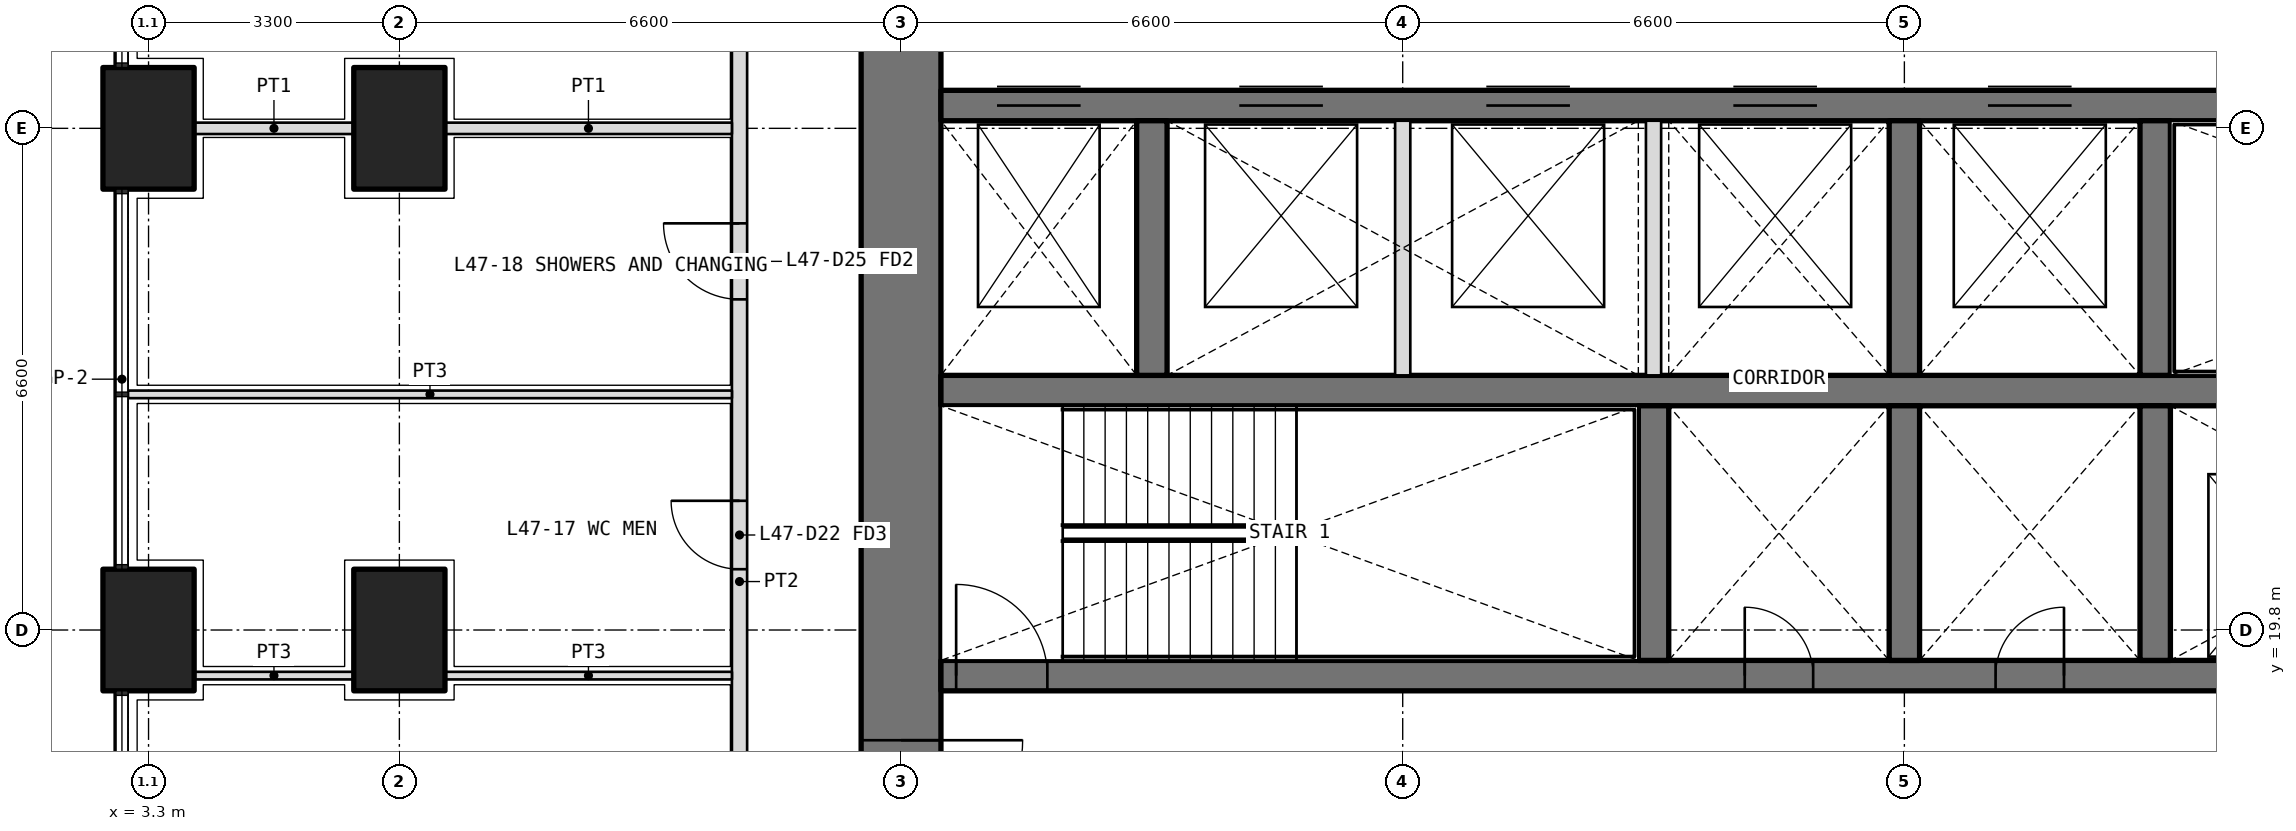
"""IFC4 building model, lengths in metres.
Left out: names, types, materials, properties, quantities, classifications, styles, units other than length and angle.
Written with IfcOpenShell. Run it as: python <this file> out.ifc"""

import sys

from ifc_helpers import new_model, si_unit, direction, frame, frame_2d, origin, origin_2d, place, context, subcontext, project, spatial, rectangle, extrude, element, fill, save


model = new_model("IFC4")
c1 = context("Model", 3, precision=1e-05, world=origin(), true_north=direction((0.0, 1.0)))
c2 = subcontext(c1, "Body", "Model", "MODEL_VIEW")
j1 = project(units=[si_unit("LENGTHUNIT", "METRE"), si_unit("PLANEANGLEUNIT", "RADIAN")], contexts=[c1])
p1 = place(None, origin())
s1 = spatial("IfcSite", under=j1, at=p1, CompositionType="ELEMENT")
p2 = place(p1, origin())
s2 = spatial("IfcBuilding", under=s1, at=p2, CompositionType="ELEMENT")
p3 = place(p2, frame((0.0, 0.0, 206.1)))
s3 = spatial("IfcBuildingStorey", under=s2, at=p3, CompositionType="ELEMENT", Elevation=206.1)
for number, where, z_axis, x_axis in (
    (1, (3.3, 19.8, 0.0), (0.0, 0.0, 1.0), (0.0, 1.0, 0.0)),
    (2, (3.3, 26.4, 0.0), (0.0, 0.0, 1.0), (0.0, 1.0, 0.0)),
    (3, (6.6, 19.8, 0.0), (0.0, 0.0, 1.0), (0.0, 1.0, 0.0)),
    (4, (6.6, 26.4, 0.0), (0.0, 0.0, 1.0), (0.0, 1.0, 0.0)),
):
    element("IfcColumn", number, at=place(p3, frame(where, z_axis=z_axis, x_axis=x_axis)), inside=s3, PredefinedType="COLUMN", context=c2, shape_type="SweptSolid", body=[
        extrude(rectangle(XDim=1.6, YDim=1.2, at=origin_2d()), origin(), (0.0, 0.0, 1.0), 4.2),
    ])
p4 = place(p3, frame((13.2, 32.475, 0.0), z_axis=(0.0, 0.0, 1.0), x_axis=(0.0, -1.0, 0.0)))
e5 = element("IfcWall", 5, at=p4, inside=s3, PredefinedType="SHEAR", context=c2, shape_type="SweptSolid", body=[
    extrude(rectangle(XDim=18.75, YDim=1.05, at=frame_2d((9.375, 0.0))), origin(), (0.0, 0.0, 1.0), 4.2),
])
p5 = place(p4, frame((14.125, 0.0, 0.0)))
e6 = element("IfcOpeningElement", 6, at=p5, cuts=e5, PredefinedType="OPENING", context=c2, shape_type="SweptSolid", body=[
    extrude(rectangle(XDim=1.6, YDim=2.1, at=frame_2d((0.8, 1.05))), frame((0.0, 0.535, 0.0), z_axis=(0.0, -1.0, 0.0), x_axis=(1.0, 0.0, 0.0)), (0.0, 0.0, 1.0), 1.07),
])
p6 = place(p4, frame((3.325, 0.0, 0.0)))
e7 = element("IfcOpeningElement", 7, at=p6, cuts=e5, PredefinedType="OPENING", context=c2, shape_type="SweptSolid", body=[
    extrude(rectangle(XDim=1.6, YDim=2.1, at=frame_2d((0.8, 1.05))), frame((0.0, 0.535, 0.0), z_axis=(0.0, -1.0, 0.0), x_axis=(1.0, 0.0, 0.0)), (0.0, 0.0, 1.0), 1.07),
])
p7 = place(p3, frame((13.725, 19.2, 0.0), z_axis=(0.0, 0.0, 1.0), x_axis=(1.0, 0.0, 0.0)))
e8 = element("IfcWall", 8, at=p7, inside=s3, PredefinedType="SHEAR", context=c2, shape_type="SweptSolid", body=[
    extrude(rectangle(XDim=25.35, YDim=0.4, at=frame_2d((12.675, 0.0))), origin(), (0.0, 0.0, 1.0), 4.2),
])
p8 = place(p7, frame((10.575, 0.0, 0.0)))
e9 = element("IfcOpeningElement", 9, at=p8, cuts=e8, PredefinedType="OPENING", context=c2, shape_type="SweptSolid", body=[
    extrude(rectangle(XDim=0.9, YDim=2.1, at=frame_2d((0.45, 1.05))), frame((0.0, 0.21, 0.0), z_axis=(0.0, -1.0, 0.0), x_axis=(1.0, 0.0, 0.0)), (0.0, 0.0, 1.0), 0.42),
])
p9 = place(p7, frame((13.875, 0.0, 0.0)))
e10 = element("IfcOpeningElement", 10, at=p9, cuts=e8, PredefinedType="OPENING", context=c2, shape_type="SweptSolid", body=[
    extrude(rectangle(XDim=0.9, YDim=2.1, at=frame_2d((0.45, 1.05))), frame((0.0, 0.21, 0.0), z_axis=(0.0, -1.0, 0.0), x_axis=(1.0, 0.0, 0.0)), (0.0, 0.0, 1.0), 0.42),
])
p10 = place(p7, frame((0.2, 0.0, 0.0)))
e11 = element("IfcOpeningElement", 11, at=p10, cuts=e8, PredefinedType="OPENING", context=c2, shape_type="SweptSolid", body=[
    extrude(rectangle(XDim=1.2, YDim=2.1, at=frame_2d((0.6, 1.05))), frame((0.0, 0.21, 0.0), z_axis=(0.0, -1.0, 0.0), x_axis=(1.0, 0.0, 0.0)), (0.0, 0.0, 1.0), 0.42),
])
p11 = place(p7, frame((23.512, 0.0, 0.0)))
e12 = element("IfcOpeningElement", 12, at=p11, cuts=e8, PredefinedType="OPENING", context=c2, shape_type="SweptSolid", body=[
    extrude(rectangle(XDim=1.1, YDim=2.1, at=frame_2d((0.55, 1.05))), frame((0.0, 0.21, 0.0), z_axis=(0.0, -1.0, 0.0), x_axis=(1.0, 0.0, 0.0)), (0.0, 0.0, 1.0), 0.42),
])
p12 = place(p7, frame((17.125, 0.0, 0.0)))
e13 = element("IfcOpeningElement", 13, at=p12, cuts=e8, PredefinedType="OPENING", context=c2, shape_type="SweptSolid", body=[
    extrude(rectangle(XDim=1.1, YDim=2.1, at=frame_2d((0.55, 1.05))), frame((0.0, 0.21, 0.0), z_axis=(0.0, -1.0, 0.0), x_axis=(1.0, 0.0, 0.0)), (0.0, 0.0, 1.0), 0.42),
])
p13 = place(p7, frame((20.325, 0.0, 0.0)))
e14 = element("IfcOpeningElement", 14, at=p13, cuts=e8, PredefinedType="OPENING", context=c2, shape_type="SweptSolid", body=[
    extrude(rectangle(XDim=1.1, YDim=2.1, at=frame_2d((0.55, 1.05))), frame((0.0, 0.21, 0.0), z_axis=(0.0, -1.0, 0.0), x_axis=(1.0, 0.0, 0.0)), (0.0, 0.0, 1.0), 0.42),
])
p14 = place(p3, frame((13.725, 22.95, 0.0), z_axis=(0.0, 0.0, 1.0), x_axis=(1.0, 0.0, 0.0)))
e15 = element("IfcWall", 15, at=p14, inside=s3, PredefinedType="SHEAR", context=c2, shape_type="SweptSolid", body=[
    extrude(rectangle(XDim=25.35, YDim=0.4, at=frame_2d((12.675, 0.0))), origin(), (0.0, 0.0, 1.0), 4.2),
])
p15 = place(p3, frame((13.725, 26.7, 0.0), z_axis=(0.0, 0.0, 1.0), x_axis=(1.0, 0.0, 0.0)))
e16 = element("IfcWall", 16, at=p15, inside=s3, PredefinedType="SHEAR", context=c2, shape_type="SweptSolid", body=[
    extrude(rectangle(XDim=25.35, YDim=0.4, at=frame_2d((12.675, 0.0))), origin(), (0.0, 0.0, 1.0), 4.2),
])
p16 = place(p15, frame((23.95, 0.0, 0.0)))
e17 = element("IfcOpeningElement", 17, at=p16, cuts=e16, PredefinedType="OPENING", context=c2, shape_type="SweptSolid", body=[
    extrude(rectangle(XDim=1.2, YDim=2.1, at=frame_2d((0.6, 1.05))), frame((0.0, 0.21, 0.0), z_axis=(0.0, -1.0, 0.0), x_axis=(1.0, 0.0, 0.0)), (0.0, 0.0, 1.0), 0.42),
])
p17 = place(p15, frame((0.738, 0.0, 0.0)))
e18 = element("IfcOpeningElement", 18, at=p17, cuts=e16, PredefinedType="OPENING", context=c2, shape_type="SweptSolid", body=[
    extrude(rectangle(XDim=1.1, YDim=2.1, at=frame_2d((0.55, 1.05))), frame((0.0, 0.21, 0.0), z_axis=(0.0, -1.0, 0.0), x_axis=(1.0, 0.0, 0.0)), (0.0, 0.0, 1.0), 0.42),
])
p18 = place(p15, frame((3.925, 0.0, 0.0)))
e19 = element("IfcOpeningElement", 19, at=p18, cuts=e16, PredefinedType="OPENING", context=c2, shape_type="SweptSolid", body=[
    extrude(rectangle(XDim=1.1, YDim=2.1, at=frame_2d((0.55, 1.05))), frame((0.0, 0.21, 0.0), z_axis=(0.0, -1.0, 0.0), x_axis=(1.0, 0.0, 0.0)), (0.0, 0.0, 1.0), 0.42),
])
p19 = place(p15, frame((7.175, 0.0, 0.0)))
e20 = element("IfcOpeningElement", 20, at=p19, cuts=e16, PredefinedType="OPENING", context=c2, shape_type="SweptSolid", body=[
    extrude(rectangle(XDim=1.1, YDim=2.1, at=frame_2d((0.55, 1.05))), frame((0.0, 0.21, 0.0), z_axis=(0.0, -1.0, 0.0), x_axis=(1.0, 0.0, 0.0)), (0.0, 0.0, 1.0), 0.42),
])
p20 = place(p15, frame((10.425, 0.0, 0.0)))
e21 = element("IfcOpeningElement", 21, at=p20, cuts=e16, PredefinedType="OPENING", context=c2, shape_type="SweptSolid", body=[
    extrude(rectangle(XDim=1.1, YDim=2.1, at=frame_2d((0.55, 1.05))), frame((0.0, 0.21, 0.0), z_axis=(0.0, -1.0, 0.0), x_axis=(1.0, 0.0, 0.0)), (0.0, 0.0, 1.0), 0.42),
])
p21 = place(p15, frame((13.775, 0.0, 0.0)))
e22 = element("IfcOpeningElement", 22, at=p21, cuts=e16, PredefinedType="OPENING", context=c2, shape_type="SweptSolid", body=[
    extrude(rectangle(XDim=1.1, YDim=2.1, at=frame_2d((0.55, 1.05))), frame((0.0, 0.21, 0.0), z_axis=(0.0, -1.0, 0.0), x_axis=(1.0, 0.0, 0.0)), (0.0, 0.0, 1.0), 0.42),
])
for number, where, z_axis, x_axis in (
    (23, (23.1, 19.4, 0.0), (0.0, 0.0, 1.0), (0.0, 1.0, 0.0)),
    (24, (26.4, 19.4, 0.0), (0.0, 0.0, 1.0), (0.0, 1.0, 0.0)),
    (25, (29.7, 19.4, 0.0), (0.0, 0.0, 1.0), (0.0, 1.0, 0.0)),
    (26, (16.5, 23.15, 0.0), (0.0, 0.0, 1.0), (0.0, 1.0, 0.0)),
    (27, (26.4, 23.15, 0.0), (0.0, 0.0, 1.0), (0.0, 1.0, 0.0)),
    (28, (29.7, 23.15, 0.0), (0.0, 0.0, 1.0), (0.0, 1.0, 0.0)),
):
    element("IfcWall", number, at=place(p3, frame(where, z_axis=z_axis, x_axis=x_axis)), inside=s3, PredefinedType="SHEAR", context=c2, shape_type="SweptSolid", body=[
        extrude(rectangle(XDim=3.35, YDim=0.4, at=frame_2d((1.675, 0.0))), origin(), (0.0, 0.0, 1.0), 4.2),
    ])
for number, where, z_axis, x_axis in (
    (29, (19.8, 23.15, 0.0), (0.0, 0.0, 1.0), (0.0, 1.0, 0.0)),
    (30, (23.1, 23.15, 0.0), (0.0, 0.0, 1.0), (0.0, 1.0, 0.0)),
):
    element("IfcWall", number, at=place(p3, frame(where, z_axis=z_axis, x_axis=x_axis)), inside=s3, PredefinedType="PARTITIONING", context=c2, shape_type="SweptSolid", body=[
        extrude(rectangle(XDim=3.35, YDim=0.2, at=frame_2d((1.675, 0.0))), origin(), (0.0, 0.0, 1.0), 4.2),
    ])
p22 = place(p3, frame((11.075, 11.175, 0.0), z_axis=(0.0, 0.0, 1.0), x_axis=(0.0, 1.0, 0.0)))
e31 = element("IfcWall", 31, at=p22, inside=s3, PredefinedType="PARTITIONING", context=c2, shape_type="SweptSolid", body=[
    extrude(rectangle(XDim=18.525, YDim=0.2, at=frame_2d((9.262, 0.0))), origin(), (0.0, 0.0, 1.0), 2.85),
])
p23 = place(p22, frame((0.363, 0.0, 0.0)))
e32 = element("IfcOpeningElement", 32, at=p23, cuts=e31, PredefinedType="OPENING", context=c2, shape_type="SweptSolid", body=[
    extrude(rectangle(XDim=1.2, YDim=2.1, at=frame_2d((0.6, 1.05))), frame((0.0, 0.11, 0.0), z_axis=(0.0, -1.0, 0.0), x_axis=(1.0, 0.0, 0.0)), (0.0, 0.0, 1.0), 0.22),
])
p24 = place(p22, frame((2.575, 0.0, 0.0)))
e33 = element("IfcOpeningElement", 33, at=p24, cuts=e31, PredefinedType="OPENING", context=c2, shape_type="SweptSolid", body=[
    extrude(rectangle(XDim=1.0, YDim=2.1, at=frame_2d((0.5, 1.05))), frame((0.0, 0.11, 0.0), z_axis=(0.0, -1.0, 0.0), x_axis=(1.0, 0.0, 0.0)), (0.0, 0.0, 1.0), 0.22),
])
p25 = place(p22, frame((5.625, 0.0, 0.0)))
e34 = element("IfcOpeningElement", 34, at=p25, cuts=e31, PredefinedType="OPENING", context=c2, shape_type="SweptSolid", body=[
    extrude(rectangle(XDim=0.9, YDim=2.1, at=frame_2d((0.45, 1.05))), frame((0.0, 0.11, 0.0), z_axis=(0.0, -1.0, 0.0), x_axis=(1.0, 0.0, 0.0)), (0.0, 0.0, 1.0), 0.22),
])
p26 = place(p22, frame((9.425, 0.0, 0.0)))
e35 = element("IfcOpeningElement", 35, at=p26, cuts=e31, PredefinedType="OPENING", context=c2, shape_type="SweptSolid", body=[
    extrude(rectangle(XDim=0.9, YDim=2.1, at=frame_2d((0.45, 1.05))), frame((0.0, 0.11, 0.0), z_axis=(0.0, -1.0, 0.0), x_axis=(1.0, 0.0, 0.0)), (0.0, 0.0, 1.0), 0.22),
])
p27 = place(p22, frame((12.975, 0.0, 0.0)))
e36 = element("IfcOpeningElement", 36, at=p27, cuts=e31, PredefinedType="OPENING", context=c2, shape_type="SweptSolid", body=[
    extrude(rectangle(XDim=1.0, YDim=2.1, at=frame_2d((0.5, 1.05))), frame((0.0, 0.11, 0.0), z_axis=(0.0, -1.0, 0.0), x_axis=(1.0, 0.0, 0.0)), (0.0, 0.0, 1.0), 0.22),
])
p28 = place(p22, frame((16.275, 0.0, 0.0)))
e37 = element("IfcOpeningElement", 37, at=p28, cuts=e31, PredefinedType="OPENING", context=c2, shape_type="SweptSolid", body=[
    extrude(rectangle(XDim=1.2, YDim=2.1, at=frame_2d((0.6, 1.05))), frame((0.0, 0.11, 0.0), z_axis=(0.0, -1.0, 0.0), x_axis=(1.0, 0.0, 0.0)), (0.0, 0.0, 1.0), 0.22),
])
p29 = place(p3, frame((3.9, 19.2, 0.0), z_axis=(0.0, 0.0, 1.0), x_axis=(1.0, 0.0, 0.0)))
e38 = element("IfcWall", 38, at=p29, inside=s3, PredefinedType="PARTITIONING", context=c2, shape_type="SweptSolid", body=[
    extrude(rectangle(XDim=2.1, YDim=0.1, at=frame_2d((1.05, 0.0))), origin(), (0.0, 0.0, 1.0), 2.85),
])
p30 = place(p3, frame((7.2, 19.2, 0.0), z_axis=(0.0, 0.0, 1.0), x_axis=(1.0, 0.0, 0.0)))
e39 = element("IfcWall", 39, at=p30, inside=s3, PredefinedType="PARTITIONING", context=c2, shape_type="SweptSolid", body=[
    extrude(rectangle(XDim=3.775, YDim=0.1, at=frame_2d((1.888, 0.0))), origin(), (0.0, 0.0, 1.0), 2.85),
])
p31 = place(p3, frame((3.03, 22.9, 0.0), z_axis=(0.0, 0.0, 1.0), x_axis=(1.0, 0.0, 0.0)))
e40 = element("IfcWall", 40, at=p31, inside=s3, PredefinedType="PARTITIONING", context=c2, shape_type="SweptSolid", body=[
    extrude(rectangle(XDim=7.945, YDim=0.1, at=frame_2d((3.973, 0.0))), origin(), (0.0, 0.0, 1.0), 2.7),
])
p32 = place(p3, frame((3.9, 26.4, 0.0), z_axis=(0.0, 0.0, 1.0), x_axis=(1.0, 0.0, 0.0)))
e41 = element("IfcWall", 41, at=p32, inside=s3, PredefinedType="PARTITIONING", context=c2, shape_type="SweptSolid", body=[
    extrude(rectangle(XDim=2.1, YDim=0.15, at=frame_2d((1.05, 0.0))), origin(), (0.0, 0.0, 1.0), 2.85),
])
p33 = place(p3, frame((7.2, 26.4, 0.0), z_axis=(0.0, 0.0, 1.0), x_axis=(1.0, 0.0, 0.0)))
e42 = element("IfcWall", 42, at=p33, inside=s3, PredefinedType="PARTITIONING", context=c2, shape_type="SweptSolid", body=[
    extrude(rectangle(XDim=3.775, YDim=0.15, at=frame_2d((1.888, 0.0))), origin(), (0.0, 0.0, 1.0), 2.85),
])
p34 = place(p26, origin())
e43 = element("IfcDoor", 43, at=p34, inside=s3, OperationType="SINGLE_SWING_RIGHT", PredefinedType="DOOR", context=c2, shape_type="SweptSolid", body=[
    extrude(rectangle(XDim=0.9, YDim=2.1, at=frame_2d((0.45, 1.05))), frame((0.0, 0.025, 0.0), z_axis=(0.0, -1.0, 0.0), x_axis=(1.0, 0.0, 0.0)), (0.0, 0.0, 1.0), 0.05),
])
fill(e35, e43)
p35 = place(p27, origin())
e44 = element("IfcDoor", 44, at=p35, inside=s3, OperationType="SINGLE_SWING_RIGHT", PredefinedType="DOOR", context=c2, shape_type="SweptSolid", body=[
    extrude(rectangle(XDim=1.0, YDim=2.1, at=frame_2d((0.5, 1.05))), frame((0.0, 0.025, 0.0), z_axis=(0.0, -1.0, 0.0), x_axis=(1.0, 0.0, 0.0)), (0.0, 0.0, 1.0), 0.05),
])
fill(e36, e44)
p36 = place(p8, origin())
e45 = element("IfcDoor", 45, at=p36, inside=s3, OperationType="SINGLE_SWING_LEFT", PredefinedType="DOOR", context=c2, shape_type="SweptSolid", body=[
    extrude(rectangle(XDim=0.9, YDim=2.1, at=frame_2d((0.45, 1.05))), frame((0.0, 0.025, 0.0), z_axis=(0.0, -1.0, 0.0), x_axis=(1.0, 0.0, 0.0)), (0.0, 0.0, 1.0), 0.05),
])
fill(e9, e45)
p37 = place(p9, origin())
e46 = element("IfcDoor", 46, at=p37, inside=s3, OperationType="SINGLE_SWING_RIGHT", PredefinedType="DOOR", context=c2, shape_type="SweptSolid", body=[
    extrude(rectangle(XDim=0.9, YDim=2.1, at=frame_2d((0.45, 1.05))), frame((0.0, 0.025, 0.0), z_axis=(0.0, -1.0, 0.0), x_axis=(1.0, 0.0, 0.0)), (0.0, 0.0, 1.0), 0.05),
])
fill(e10, e46)
p38 = place(p10, origin())
e47 = element("IfcDoor", 47, at=p38, inside=s3, OperationType="SINGLE_SWING_LEFT", PredefinedType="DOOR", context=c2, shape_type="SweptSolid", body=[
    extrude(rectangle(XDim=1.2, YDim=2.1, at=frame_2d((0.6, 1.05))), frame((0.0, 0.025, 0.0), z_axis=(0.0, -1.0, 0.0), x_axis=(1.0, 0.0, 0.0)), (0.0, 0.0, 1.0), 0.05),
])
fill(e11, e47)
p39 = place(p5, origin())
e48 = element("IfcDoor", 48, at=p39, inside=s3, OperationType="DOUBLE_DOOR_DOUBLE_SWING", PredefinedType="DOOR", context=c2, shape_type="SweptSolid", body=[
    extrude(rectangle(XDim=1.6, YDim=2.1, at=frame_2d((0.8, 1.05))), frame((0.0, 0.025, 0.0), z_axis=(0.0, -1.0, 0.0), x_axis=(1.0, 0.0, 0.0)), (0.0, 0.0, 1.0), 0.05),
])
fill(e6, e48)
p40 = place(p17, origin())
e49 = element("IfcDoor", 49, at=p40, inside=s3, OperationType="DOUBLE_DOOR_SLIDING", PredefinedType="DOOR", context=c2, shape_type="SweptSolid", body=[
    extrude(rectangle(XDim=1.1, YDim=2.1, at=frame_2d((0.55, 1.05))), frame((0.0, 0.025, 0.0), z_axis=(0.0, -1.0, 0.0), x_axis=(1.0, 0.0, 0.0)), (0.0, 0.0, 1.0), 0.05),
])
fill(e18, e49)
p41 = place(p18, origin())
e50 = element("IfcDoor", 50, at=p41, inside=s3, OperationType="DOUBLE_DOOR_SLIDING", PredefinedType="DOOR", context=c2, shape_type="SweptSolid", body=[
    extrude(rectangle(XDim=1.1, YDim=2.1, at=frame_2d((0.55, 1.05))), frame((0.0, 0.025, 0.0), z_axis=(0.0, -1.0, 0.0), x_axis=(1.0, 0.0, 0.0)), (0.0, 0.0, 1.0), 0.05),
])
fill(e19, e50)
p42 = place(p19, origin())
e51 = element("IfcDoor", 51, at=p42, inside=s3, OperationType="DOUBLE_DOOR_SLIDING", PredefinedType="DOOR", context=c2, shape_type="SweptSolid", body=[
    extrude(rectangle(XDim=1.1, YDim=2.1, at=frame_2d((0.55, 1.05))), frame((0.0, 0.025, 0.0), z_axis=(0.0, -1.0, 0.0), x_axis=(1.0, 0.0, 0.0)), (0.0, 0.0, 1.0), 0.05),
])
fill(e20, e51)
p43 = place(p20, origin())
e52 = element("IfcDoor", 52, at=p43, inside=s3, OperationType="DOUBLE_DOOR_SLIDING", PredefinedType="DOOR", context=c2, shape_type="SweptSolid", body=[
    extrude(rectangle(XDim=1.1, YDim=2.1, at=frame_2d((0.55, 1.05))), frame((0.0, 0.025, 0.0), z_axis=(0.0, -1.0, 0.0), x_axis=(1.0, 0.0, 0.0)), (0.0, 0.0, 1.0), 0.05),
])
fill(e21, e52)
p44 = place(p21, origin())
e53 = element("IfcDoor", 53, at=p44, inside=s3, OperationType="DOUBLE_DOOR_SLIDING", PredefinedType="DOOR", context=c2, shape_type="SweptSolid", body=[
    extrude(rectangle(XDim=1.1, YDim=2.1, at=frame_2d((0.55, 1.05))), frame((0.0, 0.025, 0.0), z_axis=(0.0, -1.0, 0.0), x_axis=(1.0, 0.0, 0.0)), (0.0, 0.0, 1.0), 0.05),
])
fill(e22, e53)
save(model, sys.argv[1])
